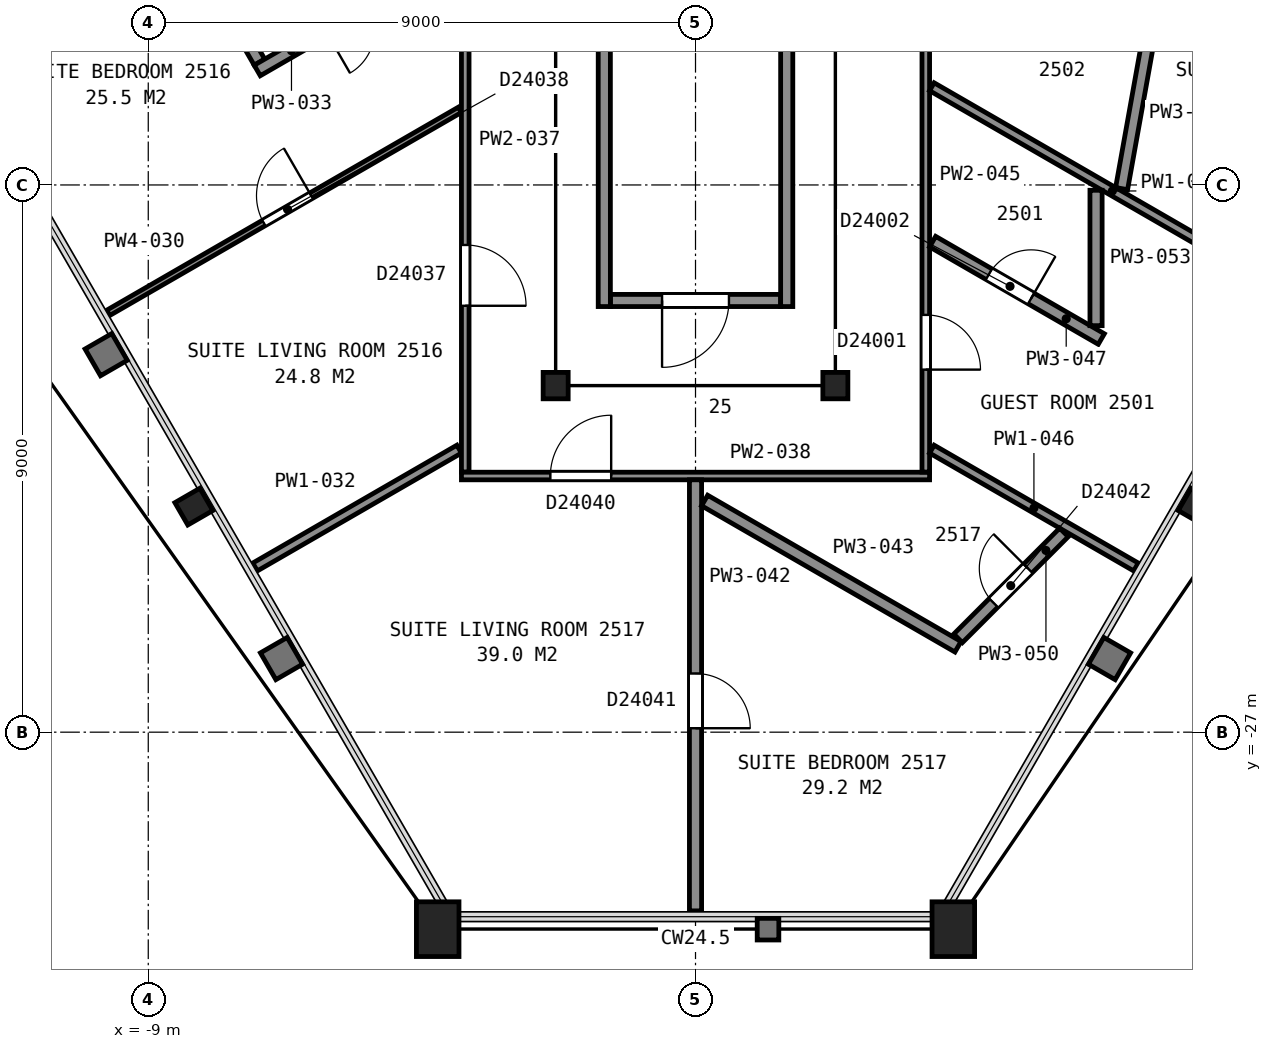
"""IFC4 building model, lengths in metres.
Left out: names, types, materials, properties, quantities, classifications, styles, units other than length and angle.
Written with IfcOpenShell. Run it as: python <this file> out.ifc"""

import sys

from ifc_helpers import new_model, si_unit, direction, frame, frame_2d, origin, origin_2d, place, context, subcontext, project, spatial, rectangle, hollow_rectangle, i_section, extrude, element, fill, save


model = new_model("IFC4")
c1 = context("Model", 3, precision=1e-05, world=origin(), true_north=direction((0.0, 1.0)))
c2 = subcontext(c1, "Body", "Model", "MODEL_VIEW")
j1 = project(units=[si_unit("LENGTHUNIT", "METRE"), si_unit("PLANEANGLEUNIT", "RADIAN")], contexts=[c1])
p1 = place(None, origin())
s1 = spatial("IfcSite", under=j1, at=p1, CompositionType="ELEMENT")
p2 = place(p1, origin())
s2 = spatial("IfcBuilding", under=s1, at=p2, CompositionType="ELEMENT")
p3 = place(p2, frame((0.0, 0.0, 107.2)))
s3 = spatial("IfcBuildingStorey", under=s2, at=p3, CompositionType="ELEMENT", Elevation=107.2)
p4 = place(p3, frame((-8.25, -23.29, 0.0), z_axis=(0.0, 0.0, 1.0), x_axis=(-0.5, 0.866025403784, 0.0)))
e1 = element("IfcColumn", 1, at=p4, inside=s3, PredefinedType="COLUMN", context=c2, shape_type="SweptSolid", body=[
    extrude(i_section(OverallWidth=0.424, OverallDepth=0.475, WebThickness=0.048, FlangeThickness=0.077, FilletRadius=0.015, at=origin_2d()), origin(), (0.0, 0.0, 1.0), 3.6),
])
for number, where, z_axis, x_axis in (
    (2, (-4.24, -30.24, 0.0), (0.0, 0.0, 1.0), (-1.0, 0.0, 0.0)),
    (3, (4.24, -30.24, 0.0), (0.0, 0.0, 1.0), (-1.0, 0.0, 0.0)),
):
    element("IfcColumn", number, at=place(p3, frame(where, z_axis=z_axis, x_axis=x_axis)), inside=s3, PredefinedType="COLUMN", context=c2, shape_type="SweptSolid", body=[
        extrude(hollow_rectangle(XDim=0.7, YDim=0.9, WallThickness=0.065, at=origin_2d()), origin(), (0.0, 0.0, 1.0), 3.6),
    ])
p5 = place(p3, frame((8.25, -23.29, 0.0), z_axis=(0.0, 0.0, 1.0), x_axis=(-0.5, -0.866025403784, 0.0)))
e4 = element("IfcColumn", 4, at=p5, inside=s3, PredefinedType="COLUMN", context=c2, shape_type="SweptSolid", body=[
    extrude(i_section(OverallWidth=0.424, OverallDepth=0.475, WebThickness=0.048, FlangeThickness=0.077, FilletRadius=0.015, at=origin_2d()), origin(), (0.0, 0.0, 1.0), 3.6),
])
for number, where, z_axis, x_axis in (
    (5, (-2.3, -21.3, 0.0), (0.0, 0.0, 1.0), (-1.0, 0.0, 0.0)),
    (6, (2.3, -21.3, 0.0), (0.0, 0.0, 1.0), (-1.0, 0.0, 0.0)),
):
    element("IfcColumn", number, at=place(p3, frame(where, z_axis=z_axis, x_axis=x_axis)), inside=s3, PredefinedType="COLUMN", context=c2, shape_type="SweptSolid", body=[
        extrude(i_section(OverallWidth=0.411, OverallDepth=0.434, WebThickness=0.036, FlangeThickness=0.057, FilletRadius=0.015, at=origin_2d()), origin(), (0.0, 0.0, 1.0), 3.6),
    ])
p6 = place(p3, frame((-1.4, -19.9, 0.0), z_axis=(0.0, 0.0, 1.0), x_axis=(1.0, 0.0, 0.0)))
e7 = element("IfcWall", 7, at=p6, inside=s3, PredefinedType="PARTITIONING", context=c2, shape_type="SweptSolid", body=[
    extrude(rectangle(XDim=2.8, YDim=0.2, at=frame_2d((1.4, 0.0))), origin(), (0.0, 0.0, 1.0), 3.35),
])
p7 = place(p6, frame((0.85, 0.0, 0.0)))
e8 = element("IfcOpeningElement", 8, at=p7, cuts=e7, PredefinedType="OPENING", context=c2, shape_type="SweptSolid", body=[
    extrude(rectangle(XDim=1.1, YDim=2.1, at=frame_2d((0.55, 1.05))), frame((0.0, 0.11, 0.0), z_axis=(0.0, -1.0, 0.0), x_axis=(1.0, 0.0, 0.0)), (0.0, 0.0, 1.0), 0.22),
])
for number, where, z_axis, x_axis in (
    (9, (1.5, -8.0, 0.0), (0.0, 0.0, 1.0), (0.0, -1.0, 0.0)),
    (10, (-1.5, -8.0, 0.0), (0.0, 0.0, 1.0), (0.0, -1.0, 0.0)),
):
    element("IfcWall", number, at=place(p3, frame(where, z_axis=z_axis, x_axis=x_axis)), inside=s3, PredefinedType="PARTITIONING", context=c2, shape_type="SweptSolid", body=[
        extrude(rectangle(XDim=12.0, YDim=0.2, at=frame_2d((6.0, 0.0))), origin(), (0.0, 0.0, 1.0), 3.35),
    ])
p8 = place(p3, frame((-12.071, -15.922, 0.0), z_axis=(0.0, 0.0, 1.0), x_axis=(0.866063309627, 0.499934339407, 0.0)))
e11 = element("IfcWall", 11, at=p8, inside=s3, PredefinedType="PARTITIONING", context=c2, shape_type="SweptSolid", body=[
    extrude(rectangle(XDim=7.348, YDim=0.15, at=frame_2d((3.674, 0.0))), origin(), (0.0, 0.0, 1.0), 2.613),
])
p9 = place(p3, frame((-9.657, -20.103, 0.0), z_axis=(0.0, 0.0, 1.0), x_axis=(0.865979781901, 0.500079011097, 0.0)))
e12 = element("IfcWall", 12, at=p9, inside=s3, PredefinedType="PARTITIONING", context=c2, shape_type="SweptSolid", body=[
    extrude(rectangle(XDim=6.678, YDim=0.1, at=frame_2d((3.339, 0.0))), origin(), (0.0, 0.0, 1.0), 2.613),
])
p10 = place(p9, frame((2.953, 0.0, 0.0)))
e13 = element("IfcOpeningElement", 13, at=p10, cuts=e12, PredefinedType="OPENING", context=c2, shape_type="SweptSolid", body=[
    extrude(rectangle(XDim=0.9, YDim=2.1, at=frame_2d((0.45, 1.05))), frame((0.0, 0.06, 0.0), z_axis=(0.0, -1.0, 0.0), x_axis=(1.0, 0.0, 0.0)), (0.0, 0.0, 1.0), 0.12),
])
p11 = place(p3, frame((-8.381, -13.884, 0.0), z_axis=(0.0, 0.0, 1.0), x_axis=(0.499795219151, -0.866143601786, 0.0)))
e14 = element("IfcWall", 14, at=p11, inside=s3, PredefinedType="PARTITIONING", context=c2, shape_type="SweptSolid", body=[
    extrude(rectangle(XDim=2.42, YDim=0.2, at=frame_2d((1.21, 0.0))), origin(), (0.0, 0.0, 1.0), 2.613),
])
p12 = place(p3, frame((-7.244, -24.283, 0.0), z_axis=(0.0, 0.0, 1.0), x_axis=(0.865997824551, 0.500047765591, 0.0)))
e15 = element("IfcWall", 15, at=p12, inside=s3, PredefinedType="PARTITIONING", context=c2, shape_type="SweptSolid", body=[
    extrude(rectangle(XDim=3.876, YDim=0.15, at=frame_2d((1.938, 0.0))), origin(), (0.0, 0.0, 1.0), 2.613),
])
p13 = place(p3, frame((-7.208, -16.117, 0.0), z_axis=(0.0, 0.0, 1.0), x_axis=(0.866091428368, 0.499885624626, 0.0)))
e16 = element("IfcWall", 16, at=p13, inside=s3, PredefinedType="PARTITIONING", context=c2, shape_type="SweptSolid", body=[
    extrude(rectangle(XDim=3.238, YDim=0.2, at=frame_2d((1.619, 0.0))), origin(), (0.0, 0.0, 1.0), 2.613),
])
p14 = place(p13, frame((1.3, 0.0, 0.0)))
e17 = element("IfcOpeningElement", 17, at=p14, cuts=e16, PredefinedType="OPENING", context=c2, shape_type="SweptSolid", body=[
    extrude(rectangle(XDim=0.8, YDim=2.1, at=frame_2d((0.4, 1.05))), frame((0.0, 0.11, 0.0), z_axis=(0.0, -1.0, 0.0), x_axis=(1.0, 0.0, 0.0)), (0.0, 0.0, 1.0), 0.22),
])
p15 = place(p3, frame((-3.787, -22.722, 0.0), z_axis=(0.0, 0.0, 1.0), x_axis=(0.0, 1.0, 0.0)))
e18 = element("IfcWall", 18, at=p15, inside=s3, PredefinedType="PARTITIONING", context=c2, shape_type="SweptSolid", body=[
    extrude(rectangle(XDim=7.197, YDim=0.125, at=frame_2d((3.599, 0.0))), origin(), (0.0, 0.0, 1.0), 2.613),
])
p16 = place(p15, frame((2.735, 0.0, 0.0)))
e19 = element("IfcOpeningElement", 19, at=p16, cuts=e18, PredefinedType="OPENING", context=c2, shape_type="SweptSolid", body=[
    extrude(rectangle(XDim=1.0, YDim=2.1, at=frame_2d((0.5, 1.05))), frame((0.0, 0.073, 0.0), z_axis=(0.0, -1.0, 0.0), x_axis=(1.0, 0.0, 0.0)), (0.0, 0.0, 1.0), 0.145),
])
p17 = place(p3, frame((3.85, -22.787, 0.0), z_axis=(0.0, 0.0, 1.0), x_axis=(-1.0, 0.0, 0.0)))
e20 = element("IfcWall", 20, at=p17, inside=s3, PredefinedType="PARTITIONING", context=c2, shape_type="SweptSolid", body=[
    extrude(rectangle(XDim=7.699, YDim=0.125, at=frame_2d((3.85, 0.0))), origin(), (0.0, 0.0, 1.0), 2.613),
])
p18 = place(p17, frame((5.237, 0.0, 0.0)))
e21 = element("IfcOpeningElement", 21, at=p18, cuts=e20, PredefinedType="OPENING", context=c2, shape_type="SweptSolid", body=[
    extrude(rectangle(XDim=1.0, YDim=2.1, at=frame_2d((0.5, 1.05))), frame((0.0, 0.073, 0.0), z_axis=(0.0, -1.0, 0.0), x_axis=(1.0, 0.0, 0.0)), (0.0, 0.0, 1.0), 0.145),
])
p19 = place(p3, frame((0.0, -22.85, 0.0), z_axis=(0.0, 0.0, 1.0), x_axis=(0.0, -1.0, 0.0)))
e22 = element("IfcWall", 22, at=p19, inside=s3, PredefinedType="PARTITIONING", context=c2, shape_type="SweptSolid", body=[
    extrude(rectangle(XDim=7.089, YDim=0.2, at=frame_2d((3.545, 0.0))), origin(), (0.0, 0.0, 1.0), 2.613),
])
p20 = place(p19, frame((3.186, 0.0, 0.0)))
e23 = element("IfcOpeningElement", 23, at=p20, cuts=e22, PredefinedType="OPENING", context=c2, shape_type="SweptSolid", body=[
    extrude(rectangle(XDim=0.9, YDim=2.1, at=frame_2d((0.45, 1.05))), frame((0.0, 0.11, 0.0), z_axis=(0.0, -1.0, 0.0), x_axis=(1.0, 0.0, 0.0)), (0.0, 0.0, 1.0), 0.22),
])
p21 = place(p3, frame((0.15, -23.19, 0.0), z_axis=(0.0, 0.0, 1.0), x_axis=(0.866061372545, -0.499937695103, 0.0)))
e24 = element("IfcWall", 24, at=p21, inside=s3, PredefinedType="PARTITIONING", context=c2, shape_type="SweptSolid", body=[
    extrude(rectangle(XDim=4.811, YDim=0.2, at=frame_2d((2.406, 0.0))), origin(), (0.0, 0.0, 1.0), 2.613),
])
p22 = place(p3, frame((3.787, -15.525, 0.0), z_axis=(0.0, 0.0, 1.0), x_axis=(0.0, -1.0, 0.0)))
e25 = element("IfcWall", 25, at=p22, inside=s3, PredefinedType="PARTITIONING", context=c2, shape_type="SweptSolid", body=[
    extrude(rectangle(XDim=7.197, YDim=0.125, at=frame_2d((3.599, 0.0))), origin(), (0.0, 0.0, 1.0), 2.613),
])
p23 = place(p22, frame((4.612, 0.0, 0.0)))
e26 = element("IfcOpeningElement", 26, at=p23, cuts=e25, PredefinedType="OPENING", context=c2, shape_type="SweptSolid", body=[
    extrude(rectangle(XDim=0.9, YDim=2.1, at=frame_2d((0.45, 1.05))), frame((0.0, 0.073, 0.0), z_axis=(0.0, -1.0, 0.0), x_axis=(1.0, 0.0, 0.0)), (0.0, 0.0, 1.0), 0.145),
])
p24 = place(p3, frame((3.887, -22.345, 0.0), z_axis=(0.0, 0.0, 1.0), x_axis=(0.865997824551, -0.500047765591, 0.0)))
e27 = element("IfcWall", 27, at=p24, inside=s3, PredefinedType="PARTITIONING", context=c2, shape_type="SweptSolid", body=[
    extrude(rectangle(XDim=3.876, YDim=0.15, at=frame_2d((1.938, 0.0))), origin(), (0.0, 0.0, 1.0), 2.613),
])
p25 = place(p3, frame((3.899, -18.932, 0.0), z_axis=(0.0, 0.0, 1.0), x_axis=(0.865973625928, -0.500089671156, 0.0)))
e28 = element("IfcWall", 28, at=p25, inside=s3, PredefinedType="PARTITIONING", context=c2, shape_type="SweptSolid", body=[
    extrude(rectangle(XDim=3.204, YDim=0.2, at=frame_2d((1.602, 0.0))), origin(), (0.0, 0.0, 1.0), 2.613),
])
p26 = place(p25, frame((1.07, 0.0, 0.0)))
e29 = element("IfcOpeningElement", 29, at=p26, cuts=e28, PredefinedType="OPENING", context=c2, shape_type="SweptSolid", body=[
    extrude(rectangle(XDim=0.8, YDim=2.1, at=frame_2d((0.4, 1.05))), frame((0.0, 0.11, 0.0), z_axis=(0.0, -1.0, 0.0), x_axis=(1.0, 0.0, 0.0)), (0.0, 0.0, 1.0), 0.22),
])
p27 = place(p3, frame((3.887, -16.385, 0.0), z_axis=(0.0, 0.0, 1.0), x_axis=(0.86602133163, -0.500007053112, 0.0)))
e30 = element("IfcWall", 30, at=p27, inside=s3, PredefinedType="PARTITIONING", context=c2, shape_type="SweptSolid", body=[
    extrude(rectangle(XDim=6.856, YDim=0.15, at=frame_2d((3.428, 0.0))), origin(), (0.0, 0.0, 1.0), 2.613),
])
p28 = place(p3, frame((4.318, -25.457, 0.0), z_axis=(0.0, 0.0, 1.0), x_axis=(0.70690846209, 0.707305044677, 0.0)))
e31 = element("IfcWall", 31, at=p28, inside=s3, PredefinedType="PARTITIONING", context=c2, shape_type="SweptSolid", body=[
    extrude(rectangle(XDim=2.462, YDim=0.2, at=frame_2d((1.231, 0.0))), origin(), (0.0, 0.0, 1.0), 2.613),
])
p29 = place(p28, frame((0.825, 0.0, 0.0)))
e32 = element("IfcOpeningElement", 32, at=p29, cuts=e31, PredefinedType="OPENING", context=c2, shape_type="SweptSolid", body=[
    extrude(rectangle(XDim=0.8, YDim=2.1, at=frame_2d((0.4, 1.05))), frame((0.0, 0.11, 0.0), z_axis=(0.0, -1.0, 0.0), x_axis=(1.0, 0.0, 0.0)), (0.0, 0.0, 1.0), 0.22),
])
p30 = place(p3, frame((6.587, -20.314, 0.0), z_axis=(0.0, 0.0, 1.0), x_axis=(0.0, 1.0, 0.0)))
e33 = element("IfcWall", 33, at=p30, inside=s3, PredefinedType="PARTITIONING", context=c2, shape_type="SweptSolid", body=[
    extrude(rectangle(XDim=2.227, YDim=0.2, at=frame_2d((1.113, 0.0))), origin(), (0.0, 0.0, 1.0), 2.613),
])
p31 = place(p3, frame((7.007, -18.06, 0.0), z_axis=(0.0, 0.0, 1.0), x_axis=(0.176615903702, 0.984279849717, 0.0)))
e34 = element("IfcWall", 34, at=p31, inside=s3, PredefinedType="PARTITIONING", context=c2, shape_type="SweptSolid", body=[
    extrude(rectangle(XDim=2.519, YDim=0.2, at=frame_2d((1.259, 0.0))), origin(), (0.0, 0.0, 1.0), 2.613),
])
p32 = place(p7, origin())
e35 = element("IfcDoor", 35, at=p32, inside=s3, OperationType="SINGLE_SWING_LEFT", PredefinedType="DOOR", context=c2, shape_type="SweptSolid", body=[
    extrude(rectangle(XDim=1.1, YDim=2.1, at=frame_2d((0.55, 1.05))), frame((0.0, 0.025, 0.0), z_axis=(0.0, -1.0, 0.0), x_axis=(1.0, 0.0, 0.0)), (0.0, 0.0, 1.0), 0.05),
])
fill(e8, e35)
p33 = place(p10, origin())
e36 = element("IfcDoor", 36, at=p33, inside=s3, OperationType="SINGLE_SWING_RIGHT", PredefinedType="DOOR", context=c2, shape_type="SweptSolid", body=[
    extrude(rectangle(XDim=0.9, YDim=2.1, at=frame_2d((0.45, 1.05))), frame((0.0, 0.025, 0.0), z_axis=(0.0, -1.0, 0.0), x_axis=(1.0, 0.0, 0.0)), (0.0, 0.0, 1.0), 0.05),
])
fill(e13, e36)
p34 = place(p16, origin())
e37 = element("IfcDoor", 37, at=p34, inside=s3, OperationType="SINGLE_SWING_LEFT", PredefinedType="DOOR", context=c2, shape_type="SweptSolid", body=[
    extrude(rectangle(XDim=1.0, YDim=2.1, at=frame_2d((0.5, 1.05))), frame((0.0, 0.025, 0.0), z_axis=(0.0, -1.0, 0.0), x_axis=(1.0, 0.0, 0.0)), (0.0, 0.0, 1.0), 0.05),
])
fill(e19, e37)
p35 = place(p18, origin())
e38 = element("IfcDoor", 38, at=p35, inside=s3, OperationType="SINGLE_SWING_LEFT", PredefinedType="DOOR", context=c2, shape_type="SweptSolid", body=[
    extrude(rectangle(XDim=1.0, YDim=2.1, at=frame_2d((0.5, 1.05))), frame((0.0, 0.025, 0.0), z_axis=(0.0, -1.0, 0.0), x_axis=(1.0, 0.0, 0.0)), (0.0, 0.0, 1.0), 0.05),
])
fill(e21, e38)
p36 = place(p20, origin())
e39 = element("IfcDoor", 39, at=p36, inside=s3, OperationType="SINGLE_SWING_RIGHT", PredefinedType="DOOR", context=c2, shape_type="SweptSolid", body=[
    extrude(rectangle(XDim=0.9, YDim=2.1, at=frame_2d((0.45, 1.05))), frame((0.0, 0.025, 0.0), z_axis=(0.0, -1.0, 0.0), x_axis=(1.0, 0.0, 0.0)), (0.0, 0.0, 1.0), 0.05),
])
fill(e23, e39)
p37 = place(p23, origin())
e40 = element("IfcDoor", 40, at=p37, inside=s3, OperationType="SINGLE_SWING_RIGHT", PredefinedType="DOOR", context=c2, shape_type="SweptSolid", body=[
    extrude(rectangle(XDim=0.9, YDim=2.1, at=frame_2d((0.45, 1.05))), frame((0.0, 0.025, 0.0), z_axis=(0.0, -1.0, 0.0), x_axis=(1.0, 0.0, 0.0)), (0.0, 0.0, 1.0), 0.05),
])
fill(e26, e40)
p38 = place(p26, origin())
e41 = element("IfcDoor", 41, at=p38, inside=s3, OperationType="SINGLE_SWING_RIGHT", PredefinedType="DOOR", context=c2, shape_type="SweptSolid", body=[
    extrude(rectangle(XDim=0.8, YDim=2.1, at=frame_2d((0.4, 1.05))), frame((0.0, 0.025, 0.0), z_axis=(0.0, -1.0, 0.0), x_axis=(1.0, 0.0, 0.0)), (0.0, 0.0, 1.0), 0.05),
])
fill(e29, e41)
p39 = place(p29, origin())
e42 = element("IfcDoor", 42, at=p39, inside=s3, OperationType="SINGLE_SWING_RIGHT", PredefinedType="DOOR", context=c2, shape_type="SweptSolid", body=[
    extrude(rectangle(XDim=0.8, YDim=2.1, at=frame_2d((0.4, 1.05))), frame((0.0, 0.025, 0.0), z_axis=(0.0, -1.0, 0.0), x_axis=(1.0, 0.0, 0.0)), (0.0, 0.0, 1.0), 0.05),
])
fill(e32, e42)
save(model, sys.argv[1])
